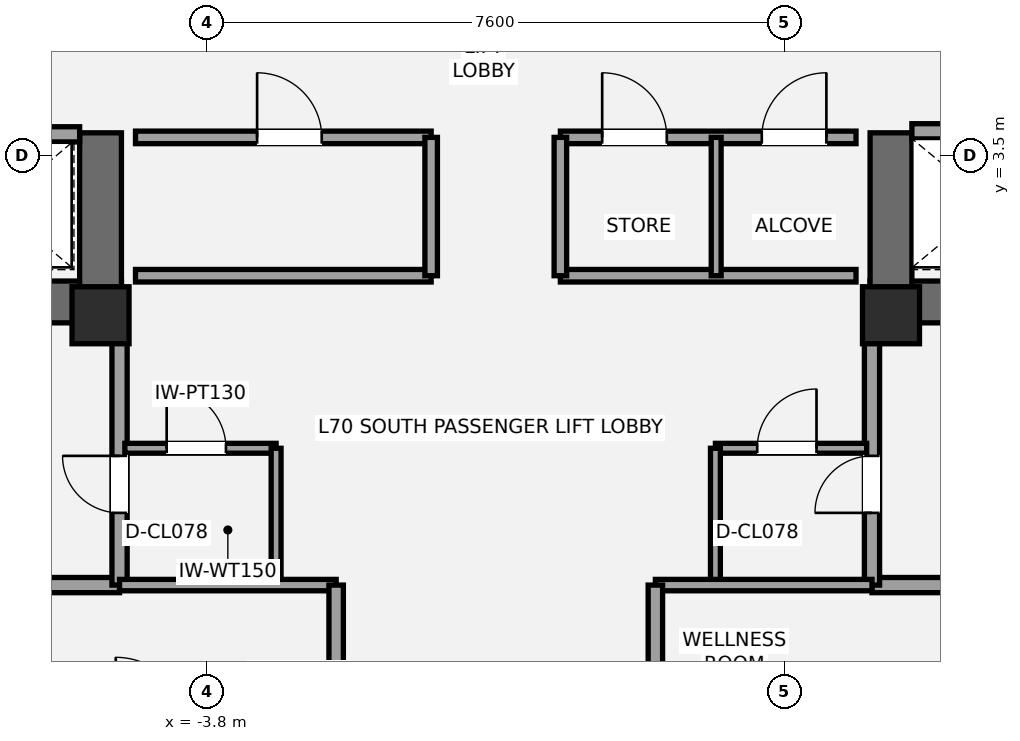
"""IFC4 building model, lengths in metres.
Left out: names, types, materials, properties, quantities, classifications, styles, units other than length and angle.
Written with IfcOpenShell. Run it as: python <this file> out.ifc"""

import sys

from ifc_helpers import new_model, si_unit, direction, frame, frame_2d, origin, origin_2d, place, context, subcontext, project, spatial, rectangle, extrude, element, fill, save


model = new_model("IFC4")
c1 = context("Model", 3, precision=1e-05, world=origin(), true_north=direction((0.0, 1.0)))
c2 = subcontext(c1, "Body", "Model", "MODEL_VIEW")
j1 = project(units=[si_unit("LENGTHUNIT", "METRE"), si_unit("PLANEANGLEUNIT", "RADIAN")], contexts=[c1])
p1 = place(None, origin())
s1 = spatial("IfcSite", under=j1, at=p1, CompositionType="ELEMENT")
p2 = place(p1, origin())
s2 = spatial("IfcBuilding", under=s1, at=p2, CompositionType="ELEMENT")
p3 = place(p2, frame((0.0, 0.0, 247.8)))
s3 = spatial("IfcBuildingStorey", under=s2, at=p3, CompositionType="ELEMENT", Elevation=247.8)
p4 = place(p3, frame((-4.925, 1.575, 0.0), z_axis=(0.0, 0.0, 1.0), x_axis=(-1.0, 0.0, 0.0)))
e1 = element("IfcWall", 1, at=p4, inside=s3, PredefinedType="SHEAR", context=c2, shape_type="SweptSolid", body=[
    extrude(rectangle(XDim=8.775, YDim=0.55, at=frame_2d((4.387, 0.0))), origin(), (0.0, 0.0, 1.0), 3.15),
])
p5 = place(p4, frame((5.375, 0.0, 0.0)))
e2 = element("IfcOpeningElement", 2, at=p5, cuts=e1, PredefinedType="OPENING", context=c2, shape_type="SweptSolid", body=[
    extrude(rectangle(XDim=1.05, YDim=2.15, at=frame_2d((0.525, 1.075))), frame((0.0, 0.285, 0.0), z_axis=(0.0, -1.0, 0.0), x_axis=(1.0, 0.0, 0.0)), (0.0, 0.0, 1.0), 0.57),
])
p6 = place(p4, frame((3.705, 0.0, 0.0)))
e3 = element("IfcOpeningElement", 3, at=p6, cuts=e1, PredefinedType="OPENING", context=c2, shape_type="SweptSolid", body=[
    extrude(rectangle(XDim=1.1, YDim=2.2, at=frame_2d((0.55, 1.1))), frame((0.0, 0.285, 0.0), z_axis=(0.0, -1.0, 0.0), x_axis=(1.0, 0.0, 0.0)), (0.0, 0.0, 1.0), 0.57),
])
p7 = place(p3, frame((-5.2, 1.3, 0.0), z_axis=(0.0, 0.0, 1.0), x_axis=(0.0, 1.0, 0.0)))
e4 = element("IfcWall", 4, at=p7, inside=s3, PredefinedType="SHEAR", context=c2, shape_type="SweptSolid", body=[
    extrude(rectangle(XDim=2.5, YDim=0.55, at=frame_2d((1.25, 0.0))), origin(), (0.0, 0.0, 1.0), 3.15),
])
p8 = place(p3, frame((13.7, 1.575, 0.0), z_axis=(0.0, 0.0, 1.0), x_axis=(-1.0, 0.0, 0.0)))
e5 = element("IfcWall", 5, at=p8, inside=s3, PredefinedType="SHEAR", context=c2, shape_type="SweptSolid", body=[
    extrude(rectangle(XDim=8.775, YDim=0.55, at=frame_2d((4.387, 0.0))), origin(), (0.0, 0.0, 1.0), 3.15),
])
p9 = place(p8, frame((2.35, 0.0, 0.0)))
e6 = element("IfcOpeningElement", 6, at=p9, cuts=e5, PredefinedType="OPENING", context=c2, shape_type="SweptSolid", body=[
    extrude(rectangle(XDim=1.05, YDim=2.15, at=frame_2d((0.525, 1.075))), frame((0.0, 0.285, 0.0), z_axis=(0.0, -1.0, 0.0), x_axis=(1.0, 0.0, 0.0)), (0.0, 0.0, 1.0), 0.57),
])
p10 = place(p8, frame((4.35, 0.0, 0.0)))
e7 = element("IfcOpeningElement", 7, at=p10, cuts=e5, PredefinedType="OPENING", context=c2, shape_type="SweptSolid", body=[
    extrude(rectangle(XDim=1.1, YDim=2.2, at=frame_2d((0.55, 1.1))), frame((0.0, 0.285, 0.0), z_axis=(0.0, -1.0, 0.0), x_axis=(1.0, 0.0, 0.0)), (0.0, 0.0, 1.0), 0.57),
])
p11 = place(p3, frame((5.2, 1.3, 0.0), z_axis=(0.0, 0.0, 1.0), x_axis=(0.0, 1.0, 0.0)))
e8 = element("IfcWall", 8, at=p11, inside=s3, PredefinedType="SHEAR", context=c2, shape_type="SweptSolid", body=[
    extrude(rectangle(XDim=2.5, YDim=0.55, at=frame_2d((1.25, 0.0))), origin(), (0.0, 0.0, 1.0), 3.15),
])
for number, where, z_axis, x_axis in (
    (9, (-5.2, 1.4, 0.0), (0.0, 0.0, 1.0), (1.0, 0.0, 0.0)),
    (10, (5.2, 1.4, 0.0), (0.0, 0.0, 1.0), (1.0, 0.0, 0.0)),
):
    element("IfcColumn", number, at=place(p3, frame(where, z_axis=z_axis, x_axis=x_axis)), inside=s3, PredefinedType="PILASTER", context=c2, shape_type="SweptSolid", body=[
        extrude(rectangle(XDim=0.75, YDim=0.75, at=origin_2d()), origin(), (0.0, 0.0, 1.0), 3.15),
    ])
p12 = place(p3, frame((-7.2, -2.15, 0.0), z_axis=(0.0, 0.0, 1.0), x_axis=(1.0, 0.0, 0.0)))
e11 = element("IfcWall", 11, at=p12, inside=s3, PredefinedType="SOLIDWALL", context=c2, shape_type="SweptSolid", body=[
    extrude(rectangle(XDim=2.25, YDim=0.2, at=frame_2d((1.125, 0.0))), origin(), (0.0, 0.0, 1.0), 2.97),
])
p13 = place(p3, frame((-4.95, -2.15, 0.0), z_axis=(0.0, 0.0, 1.0), x_axis=(0.0, 1.0, 0.0)))
e12 = element("IfcWall", 12, at=p13, inside=s3, PredefinedType="SOLIDWALL", context=c2, shape_type="SweptSolid", body=[
    extrude(rectangle(XDim=3.5, YDim=0.2, at=frame_2d((1.75, 0.0))), origin(), (0.0, 0.0, 1.0), 2.423),
])
p14 = place(p13, frame((0.95, 0.0, 0.0)))
e13 = element("IfcOpeningElement", 13, at=p14, cuts=e12, PredefinedType="OPENING", context=c2, shape_type="SweptSolid", body=[
    extrude(rectangle(XDim=0.75, YDim=2.1, at=frame_2d((0.375, 1.05))), frame((0.0, 0.11, 0.0), z_axis=(0.0, -1.0, 0.0), x_axis=(1.0, 0.0, 0.0)), (0.0, 0.0, 1.0), 0.22),
])
p15 = place(p3, frame((4.95, -2.15, 0.0), z_axis=(0.0, 0.0, 1.0), x_axis=(1.0, 0.0, 0.0)))
e14 = element("IfcWall", 14, at=p15, inside=s3, PredefinedType="SOLIDWALL", context=c2, shape_type="SweptSolid", body=[
    extrude(rectangle(XDim=2.25, YDim=0.2, at=frame_2d((1.125, 0.0))), origin(), (0.0, 0.0, 1.0), 2.97),
])
p16 = place(p3, frame((4.95, -2.15, 0.0), z_axis=(0.0, 0.0, 1.0), x_axis=(0.0, 1.0, 0.0)))
e15 = element("IfcWall", 15, at=p16, inside=s3, PredefinedType="SOLIDWALL", context=c2, shape_type="SweptSolid", body=[
    extrude(rectangle(XDim=3.5, YDim=0.2, at=frame_2d((1.75, 0.0))), origin(), (0.0, 0.0, 1.0), 2.423),
])
p17 = place(p16, frame((0.95, 0.0, 0.0)))
e16 = element("IfcOpeningElement", 16, at=p17, cuts=e15, PredefinedType="OPENING", context=c2, shape_type="SweptSolid", body=[
    extrude(rectangle(XDim=0.75, YDim=2.1, at=frame_2d((0.375, 1.05))), frame((0.0, 0.11, 0.0), z_axis=(0.0, -1.0, 0.0), x_axis=(1.0, 0.0, 0.0)), (0.0, 0.0, 1.0), 0.22),
])
p18 = place(p3, frame((-4.88, -0.35, 0.0), z_axis=(0.0, 0.0, 1.0), x_axis=(1.0, 0.0, 0.0)))
e17 = element("IfcWall", 17, at=p18, inside=s3, PredefinedType="PARTITIONING", context=c2, shape_type="SweptSolid", body=[
    extrude(rectangle(XDim=1.99, YDim=0.13, at=frame_2d((0.995, 0.0))), origin(), (0.0, 0.0, 1.0), 2.97),
])
p19 = place(p18, frame((0.55, 0.0, 0.0)))
e18 = element("IfcOpeningElement", 18, at=p19, cuts=e17, PredefinedType="OPENING", context=c2, shape_type="SweptSolid", body=[
    extrude(rectangle(XDim=0.78, YDim=2.1, at=frame_2d((0.39, 1.05))), frame((0.0, 0.075, 0.0), z_axis=(0.0, -1.0, 0.0), x_axis=(1.0, 0.0, 0.0)), (0.0, 0.0, 1.0), 0.15),
])
p20 = place(p3, frame((-2.89, -2.15, 0.0), z_axis=(0.0, 0.0, 1.0), x_axis=(0.0, 1.0, 0.0)))
e19 = element("IfcWall", 19, at=p20, inside=s3, PredefinedType="PARTITIONING", context=c2, shape_type="SweptSolid", body=[
    extrude(rectangle(XDim=1.8, YDim=0.13, at=frame_2d((0.9, 0.0))), origin(), (0.0, 0.0, 1.0), 2.423),
])
p21 = place(p3, frame((2.89, -0.35, 0.0), z_axis=(0.0, 0.0, 1.0), x_axis=(1.0, 0.0, 0.0)))
e20 = element("IfcWall", 20, at=p21, inside=s3, PredefinedType="PARTITIONING", context=c2, shape_type="SweptSolid", body=[
    extrude(rectangle(XDim=1.99, YDim=0.13, at=frame_2d((0.995, 0.0))), origin(), (0.0, 0.0, 1.0), 2.97),
])
p22 = place(p21, frame((0.55, 0.0, 0.0)))
e21 = element("IfcOpeningElement", 21, at=p22, cuts=e20, PredefinedType="OPENING", context=c2, shape_type="SweptSolid", body=[
    extrude(rectangle(XDim=0.78, YDim=2.1, at=frame_2d((0.39, 1.05))), frame((0.0, 0.075, 0.0), z_axis=(0.0, -1.0, 0.0), x_axis=(1.0, 0.0, 0.0)), (0.0, 0.0, 1.0), 0.15),
])
p23 = place(p3, frame((2.89, -2.15, 0.0), z_axis=(0.0, 0.0, 1.0), x_axis=(0.0, 1.0, 0.0)))
e22 = element("IfcWall", 22, at=p23, inside=s3, PredefinedType="PARTITIONING", context=c2, shape_type="SweptSolid", body=[
    extrude(rectangle(XDim=1.8, YDim=0.13, at=frame_2d((0.9, 0.0))), origin(), (0.0, 0.0, 1.0), 2.97),
])
p24 = place(p3, frame((-9.78, 3.78, 0.0), z_axis=(0.0, 0.0, 1.0), x_axis=(1.0, 0.0, 0.0)))
e23 = element("IfcWall", 23, at=p24, inside=s3, PredefinedType="SOLIDWALL", context=c2, shape_type="SweptSolid", body=[
    extrude(rectangle(XDim=4.305, YDim=0.2, at=frame_2d((2.152, 0.0))), origin(), (0.0, 0.0, 1.0), 2.97),
])
p25 = place(p24, frame((2.72, 0.0, 0.0)))
e24 = element("IfcOpeningElement", 24, at=p25, cuts=e23, PredefinedType="OPENING", context=c2, shape_type="SweptSolid", body=[
    extrude(rectangle(XDim=1.1, YDim=2.2, at=frame_2d((0.55, 1.1))), frame((0.0, 0.11, 0.0), z_axis=(0.0, -1.0, 0.0), x_axis=(1.0, 0.0, 0.0)), (0.0, 0.0, 1.0), 0.22),
])
p26 = place(p3, frame((5.475, 3.82, 0.0), z_axis=(0.0, 0.0, 1.0), x_axis=(1.0, 0.0, 0.0)))
e25 = element("IfcWall", 25, at=p26, inside=s3, PredefinedType="SOLIDWALL", context=c2, shape_type="SweptSolid", body=[
    extrude(rectangle(XDim=4.305, YDim=0.2, at=frame_2d((2.152, 0.0))), origin(), (0.0, 0.0, 1.0), 2.97),
])
p27 = place(p26, frame((0.65, 0.0, 0.0)))
e26 = element("IfcOpeningElement", 26, at=p27, cuts=e25, PredefinedType="OPENING", context=c2, shape_type="SweptSolid", body=[
    extrude(rectangle(XDim=1.2, YDim=2.2, at=frame_2d((0.6, 1.1))), frame((0.0, 0.11, 0.0), z_axis=(0.0, -1.0, 0.0), x_axis=(1.0, 0.0, 0.0)), (0.0, 0.0, 1.0), 0.22),
])
p28 = place(p3, frame((-4.74, 1.92, 0.0), z_axis=(0.0, 0.0, 1.0), x_axis=(1.0, 0.0, 0.0)))
e27 = element("IfcWall", 27, at=p28, inside=s3, PredefinedType="PARTITIONING", context=c2, shape_type="SweptSolid", body=[
    extrude(rectangle(XDim=3.89, YDim=0.165, at=frame_2d((1.945, 0.0))), origin(), (0.0, 0.0, 1.0), 2.11),
])
p29 = place(p3, frame((-4.74, 3.74, 0.0), z_axis=(0.0, 0.0, 1.0), x_axis=(1.0, 0.0, 0.0)))
e28 = element("IfcWall", 28, at=p29, inside=s3, PredefinedType="PARTITIONING", context=c2, shape_type="SweptSolid", body=[
    extrude(rectangle(XDim=3.89, YDim=0.165, at=frame_2d((1.945, 0.0))), origin(), (0.0, 0.0, 1.0), 2.97),
])
p30 = place(p29, frame((1.6, 0.0, 0.0)))
e29 = element("IfcOpeningElement", 29, at=p30, cuts=e28, PredefinedType="OPENING", context=c2, shape_type="SweptSolid", body=[
    extrude(rectangle(XDim=0.85, YDim=2.1, at=frame_2d((0.425, 1.05))), frame((0.0, 0.093, 0.0), z_axis=(0.0, -1.0, 0.0), x_axis=(1.0, 0.0, 0.0)), (0.0, 0.0, 1.0), 0.185),
])
p31 = place(p3, frame((-0.85, 1.92, 0.0), z_axis=(0.0, 0.0, 1.0), x_axis=(0.0, 1.0, 0.0)))
e30 = element("IfcWall", 30, at=p31, inside=s3, PredefinedType="PARTITIONING", context=c2, shape_type="SweptSolid", body=[
    extrude(rectangle(XDim=1.82, YDim=0.165, at=frame_2d((0.91, 0.0))), origin(), (0.0, 0.0, 1.0), 2.97),
])
p32 = place(p3, frame((0.85, 1.92, 0.0), z_axis=(0.0, 0.0, 1.0), x_axis=(1.0, 0.0, 0.0)))
e31 = element("IfcWall", 31, at=p32, inside=s3, PredefinedType="PARTITIONING", context=c2, shape_type="SweptSolid", body=[
    extrude(rectangle(XDim=3.89, YDim=0.165, at=frame_2d((1.945, 0.0))), origin(), (0.0, 0.0, 1.0), 2.11),
])
p33 = place(p3, frame((0.85, 3.74, 0.0), z_axis=(0.0, 0.0, 1.0), x_axis=(1.0, 0.0, 0.0)))
e32 = element("IfcWall", 32, at=p33, inside=s3, PredefinedType="PARTITIONING", context=c2, shape_type="SweptSolid", body=[
    extrude(rectangle(XDim=3.89, YDim=0.165, at=frame_2d((1.945, 0.0))), origin(), (0.0, 0.0, 1.0), 2.97),
])
p34 = place(p33, frame((0.55, 0.0, 0.0)))
e33 = element("IfcOpeningElement", 33, at=p34, cuts=e32, PredefinedType="OPENING", context=c2, shape_type="SweptSolid", body=[
    extrude(rectangle(XDim=0.85, YDim=2.1, at=frame_2d((0.425, 1.05))), frame((0.0, 0.093, 0.0), z_axis=(0.0, -1.0, 0.0), x_axis=(1.0, 0.0, 0.0)), (0.0, 0.0, 1.0), 0.185),
])
p35 = place(p33, frame((2.65, 0.0, 0.0)))
e34 = element("IfcOpeningElement", 34, at=p35, cuts=e32, PredefinedType="OPENING", context=c2, shape_type="SweptSolid", body=[
    extrude(rectangle(XDim=0.85, YDim=2.1, at=frame_2d((0.425, 1.05))), frame((0.0, 0.093, 0.0), z_axis=(0.0, -1.0, 0.0), x_axis=(1.0, 0.0, 0.0)), (0.0, 0.0, 1.0), 0.185),
])
p36 = place(p3, frame((0.85, 1.92, 0.0), z_axis=(0.0, 0.0, 1.0), x_axis=(0.0, 1.0, 0.0)))
e35 = element("IfcWall", 35, at=p36, inside=s3, PredefinedType="PARTITIONING", context=c2, shape_type="SweptSolid", body=[
    extrude(rectangle(XDim=1.82, YDim=0.165, at=frame_2d((0.91, 0.0))), origin(), (0.0, 0.0, 1.0), 2.97),
])
p37 = place(p3, frame((2.9, 1.92, 0.0), z_axis=(0.0, 0.0, 1.0), x_axis=(0.0, 1.0, 0.0)))
e36 = element("IfcWall", 36, at=p37, inside=s3, PredefinedType="PARTITIONING", context=c2, shape_type="SweptSolid", body=[
    extrude(rectangle(XDim=1.82, YDim=0.13, at=frame_2d((0.91, 0.0))), origin(), (0.0, 0.0, 1.0), 2.97),
])
p38 = place(p3, frame((-4.95, -2.15, 0.0), z_axis=(0.0, 0.0, 1.0), x_axis=(1.0, 0.0, 0.0)))
e37 = element("IfcWall", 37, at=p38, inside=s3, PredefinedType="PLUMBINGWALL", context=c2, shape_type="SweptSolid", body=[
    extrude(rectangle(XDim=2.85, YDim=0.15, at=frame_2d((1.425, 0.0))), origin(), (0.0, 0.0, 1.0), 2.423),
])
p39 = place(p3, frame((-2.1, -4.05, 0.0), z_axis=(0.0, 0.0, 1.0), x_axis=(0.0, 1.0, 0.0)))
e38 = element("IfcWall", 38, at=p39, inside=s3, PredefinedType="PLUMBINGWALL", context=c2, shape_type="SweptSolid", body=[
    extrude(rectangle(XDim=1.9, YDim=0.19, at=frame_2d((0.95, 0.0))), origin(), (0.0, 0.0, 1.0), 2.423),
])
p40 = place(p3, frame((2.1, -2.15, 0.0), z_axis=(0.0, 0.0, 1.0), x_axis=(1.0, 0.0, 0.0)))
e39 = element("IfcWall", 39, at=p40, inside=s3, PredefinedType="PLUMBINGWALL", context=c2, shape_type="SweptSolid", body=[
    extrude(rectangle(XDim=2.85, YDim=0.15, at=frame_2d((1.425, 0.0))), origin(), (0.0, 0.0, 1.0), 2.97),
])
p41 = place(p3, frame((2.1, -4.05, 0.0), z_axis=(0.0, 0.0, 1.0), x_axis=(0.0, 1.0, 0.0)))
e40 = element("IfcWall", 40, at=p41, inside=s3, PredefinedType="PLUMBINGWALL", context=c2, shape_type="SweptSolid", body=[
    extrude(rectangle(XDim=1.9, YDim=0.19, at=frame_2d((0.95, 0.0))), origin(), (0.0, 0.0, 1.0), 2.97),
])
p42 = place(p14, origin())
e41 = element("IfcDoor", 41, at=p42, inside=s3, OperationType="SINGLE_SWING_RIGHT", PredefinedType="DOOR", context=c2, shape_type="SweptSolid", body=[
    extrude(rectangle(XDim=0.75, YDim=2.1, at=frame_2d((0.375, 1.05))), frame((0.0, 0.025, 0.0), z_axis=(0.0, -1.0, 0.0), x_axis=(1.0, 0.0, 0.0)), (0.0, 0.0, 1.0), 0.05),
])
fill(e13, e41)
p43 = place(p17, origin())
e42 = element("IfcDoor", 42, at=p43, inside=s3, OperationType="SINGLE_SWING_LEFT", PredefinedType="DOOR", context=c2, shape_type="SweptSolid", body=[
    extrude(rectangle(XDim=0.75, YDim=2.1, at=frame_2d((0.375, 1.05))), frame((0.0, 0.025, 0.0), z_axis=(0.0, -1.0, 0.0), x_axis=(1.0, 0.0, 0.0)), (0.0, 0.0, 1.0), 0.05),
])
fill(e16, e42)
p44 = place(p19, origin())
e43 = element("IfcDoor", 43, at=p44, inside=s3, OperationType="SINGLE_SWING_LEFT", PredefinedType="DOOR", context=c2, shape_type="SweptSolid", body=[
    extrude(rectangle(XDim=0.78, YDim=2.1, at=frame_2d((0.39, 1.05))), frame((0.0, 0.025, 0.0), z_axis=(0.0, -1.0, 0.0), x_axis=(1.0, 0.0, 0.0)), (0.0, 0.0, 1.0), 0.05),
])
fill(e18, e43)
p45 = place(p22, origin())
e44 = element("IfcDoor", 44, at=p45, inside=s3, OperationType="SINGLE_SWING_RIGHT", PredefinedType="DOOR", context=c2, shape_type="SweptSolid", body=[
    extrude(rectangle(XDim=0.78, YDim=2.1, at=frame_2d((0.39, 1.05))), frame((0.0, 0.025, 0.0), z_axis=(0.0, -1.0, 0.0), x_axis=(1.0, 0.0, 0.0)), (0.0, 0.0, 1.0), 0.05),
])
fill(e21, e44)
p46 = place(p30, origin())
e45 = element("IfcDoor", 45, at=p46, inside=s3, OperationType="SINGLE_SWING_LEFT", PredefinedType="DOOR", context=c2, shape_type="SweptSolid", body=[
    extrude(rectangle(XDim=0.85, YDim=2.1, at=frame_2d((0.425, 1.05))), frame((0.0, 0.025, 0.0), z_axis=(0.0, -1.0, 0.0), x_axis=(1.0, 0.0, 0.0)), (0.0, 0.0, 1.0), 0.05),
])
fill(e29, e45)
p47 = place(p34, origin())
e46 = element("IfcDoor", 46, at=p47, inside=s3, OperationType="SINGLE_SWING_LEFT", PredefinedType="DOOR", context=c2, shape_type="SweptSolid", body=[
    extrude(rectangle(XDim=0.85, YDim=2.1, at=frame_2d((0.425, 1.05))), frame((0.0, 0.025, 0.0), z_axis=(0.0, -1.0, 0.0), x_axis=(1.0, 0.0, 0.0)), (0.0, 0.0, 1.0), 0.05),
])
fill(e33, e46)
p48 = place(p35, origin())
e47 = element("IfcDoor", 47, at=p48, inside=s3, OperationType="SINGLE_SWING_RIGHT", PredefinedType="DOOR", context=c2, shape_type="SweptSolid", body=[
    extrude(rectangle(XDim=0.85, YDim=2.1, at=frame_2d((0.425, 1.05))), frame((0.0, 0.025, 0.0), z_axis=(0.0, -1.0, 0.0), x_axis=(1.0, 0.0, 0.0)), (0.0, 0.0, 1.0), 0.05),
])
fill(e34, e47)
save(model, sys.argv[1])
